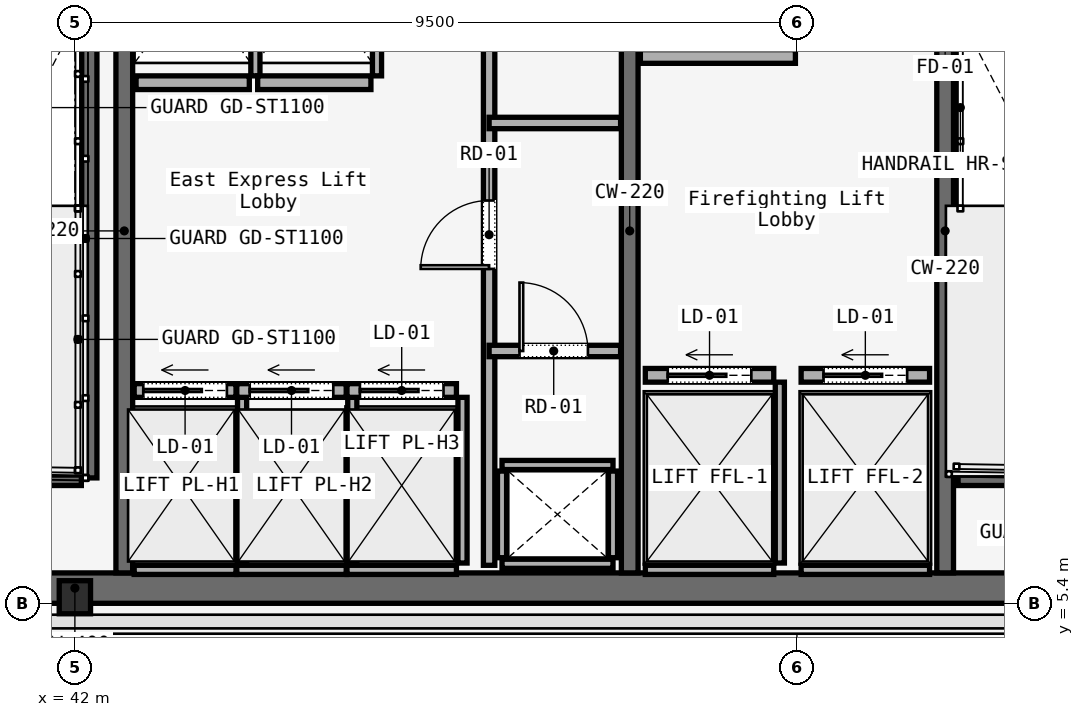
"""IFC4 building model, lengths in metres.
Left out: names, types, materials, properties, quantities, classifications, styles, units other than length and angle.
Written with IfcOpenShell. Run it as: python <this file> out.ifc"""

import sys

from ifc_helpers import new_model, si_unit, direction, frame, frame_2d, origin, origin_2d, place, context, subcontext, project, spatial, rectangle, i_section, extrude, element, fill, save


model = new_model("IFC4")
c1 = context("Model", 3, precision=1e-05, world=origin(), true_north=direction((0.0, 1.0)))
c2 = subcontext(c1, "Body", "Model", "MODEL_VIEW")
j1 = project(units=[si_unit("LENGTHUNIT", "METRE"), si_unit("PLANEANGLEUNIT", "RADIAN")], contexts=[c1])
p1 = place(None, origin())
s1 = spatial("IfcSite", under=j1, at=p1, CompositionType="ELEMENT")
p2 = place(p1, origin())
s2 = spatial("IfcBuilding", under=s1, at=p2, CompositionType="ELEMENT")
p3 = place(p2, frame((0.0, 0.0, 244.6)))
s3 = spatial("IfcBuildingStorey", under=s2, at=p3, CompositionType="ELEMENT", Elevation=244.6)
p4 = place(p3, frame((26.45, 5.6, 0.0), z_axis=(0.0, 0.0, 1.0), x_axis=(1.0, 0.0, 0.0)))
e1 = element("IfcWall", 1, at=p4, inside=s3, PredefinedType="SOLIDWALL", context=c2, shape_type="SweptSolid", body=[
    extrude(rectangle(XDim=31.1, YDim=0.4, at=frame_2d((15.55, 0.0))), origin(), (0.0, 0.0, 1.0), 3.58),
])
for number, where, z_axis, x_axis in (
    (2, (42.65, 5.8, 0.0), (0.0, 0.0, 1.0), (0.0, 1.0, 0.0)),
    (3, (49.3, 5.8, 0.0), (0.0, 0.0, 1.0), (0.0, 1.0, 0.0)),
):
    element("IfcWall", number, at=place(p3, frame(where, z_axis=z_axis, x_axis=x_axis)), inside=s3, PredefinedType="SOLIDWALL", context=c2, shape_type="SweptSolid", body=[
        extrude(rectangle(XDim=9.0, YDim=0.22, at=frame_2d((4.5, 0.0))), origin(), (0.0, 0.0, 1.0), 3.58),
    ])
p5 = place(p3, frame((53.45, 5.8, 0.0), z_axis=(0.0, 0.0, 1.0), x_axis=(0.0, 1.0, 0.0)))
e4 = element("IfcWall", 4, at=p5, inside=s3, PredefinedType="SOLIDWALL", context=c2, shape_type="SweptSolid", body=[
    extrude(rectangle(XDim=9.0, YDim=0.22, at=frame_2d((4.5, 0.0))), origin(), (0.0, 0.0, 1.0), 3.58),
])
p6 = place(p5, frame((7.5, 0.0, 0.0)))
e5 = element("IfcOpeningElement", 5, at=p6, cuts=e4, PredefinedType="OPENING", context=c2, shape_type="SweptSolid", body=[
    extrude(rectangle(XDim=1.1, YDim=2.2, at=frame_2d((0.55, 1.1))), frame((0.0, 0.11, 0.0), z_axis=(0.0, -1.0, 0.0), x_axis=(1.0, 0.0, 0.0)), (0.0, 0.0, 1.0), 0.22),
])
p7 = place(p3, frame((42.0, 5.48, 0.0), z_axis=(0.0, 0.0, 1.0), x_axis=(1.0, 0.0, 0.0)))
e6 = element("IfcColumn", 6, at=p7, inside=s3, PredefinedType="COLUMN", context=c2, shape_type="SweptSolid", body=[
    extrude(i_section(OverallWidth=0.412, OverallDepth=0.435, WebThickness=0.036, FlangeThickness=0.044, FilletRadius=0.015, at=origin_2d()), origin(), (0.0, 0.0, 1.0), 3.58),
])
p8 = place(p3, frame((42.19, 14.7, 0.0), z_axis=(0.0, 0.0, 1.0), x_axis=(0.0, -1.0, 0.0)))
e7 = element("IfcWall", 7, at=p8, inside=s3, PredefinedType="SOLIDWALL", context=c2, shape_type="SweptSolid", body=[
    extrude(rectangle(XDim=7.65, YDim=0.2, at=frame_2d((3.825, 0.0))), origin(), (0.0, 0.0, 1.0), 3.8),
])
for number, where, z_axis, x_axis in (
    (8, (38.97, 7.05, 0.0), (0.0, 0.0, 1.0), (1.0, 0.0, 0.0)),
    (9, (53.62, 7.05, 0.0), (0.0, 0.0, 1.0), (1.0, 0.0, 0.0)),
):
    element("IfcWall", number, at=place(p3, frame(where, z_axis=z_axis, x_axis=x_axis)), inside=s3, PredefinedType="SOLIDWALL", context=c2, shape_type="SweptSolid", body=[
        extrude(rectangle(XDim=3.115, YDim=0.2, at=frame_2d((1.558, 0.0))), origin(), (0.0, 0.0, 1.0), 3.8),
    ])
for number, where, z_axis, x_axis in (
    (10, (47.62, 5.92, 0.0), (0.0, 0.0, 1.0), (1.0, 0.0, 0.0)),
    (11, (47.62, 7.22, 0.0), (0.0, 0.0, 1.0), (1.0, 0.0, 0.0)),
):
    element("IfcWall", number, at=place(p3, frame(where, z_axis=z_axis, x_axis=x_axis)), inside=s3, PredefinedType="SOLIDWALL", context=c2, shape_type="SweptSolid", body=[
        extrude(rectangle(XDim=1.46, YDim=0.12, at=frame_2d((0.73, 0.0))), origin(), (0.0, 0.0, 1.0), 3.01),
    ])
for number, where, z_axis, x_axis in (
    (12, (47.62, 6.0, 0.0), (0.0, 0.0, 1.0), (0.0, 1.0, 0.0)),
    (13, (49.08, 6.0, 0.0), (0.0, 0.0, 1.0), (0.0, 1.0, 0.0)),
):
    element("IfcWall", number, at=place(p3, frame(where, z_axis=z_axis, x_axis=x_axis)), inside=s3, PredefinedType="SOLIDWALL", context=c2, shape_type="SweptSolid", body=[
        extrude(rectangle(XDim=1.14, YDim=0.12, at=frame_2d((0.57, 0.0))), origin(), (0.0, 0.0, 1.0), 3.01),
    ])
p9 = place(p3, frame((47.45, 5.9, 0.0), z_axis=(0.0, 0.0, 1.0), x_axis=(0.0, 1.0, 0.0)))
e14 = element("IfcWall", 14, at=p9, inside=s3, PredefinedType="PARTITIONING", context=c2, shape_type="SweptSolid", body=[
    extrude(rectangle(XDim=8.85, YDim=0.15, at=frame_2d((4.425, 0.0))), origin(), (0.0, 0.0, 1.0), 3.01),
])
p10 = place(p9, frame((3.9, 0.0, 0.0)))
e15 = element("IfcOpeningElement", 15, at=p10, cuts=e14, PredefinedType="OPENING", context=c2, shape_type="SweptSolid", body=[
    extrude(rectangle(XDim=0.9, YDim=2.1, at=frame_2d((0.45, 1.05))), frame((0.0, 0.075, 0.0), z_axis=(0.0, -1.0, 0.0), x_axis=(1.0, 0.0, 0.0)), (0.0, 0.0, 1.0), 0.15),
])
p11 = place(p3, frame((47.45, 8.72, 0.0), z_axis=(0.0, 0.0, 1.0), x_axis=(1.0, 0.0, 0.0)))
e16 = element("IfcWall", 16, at=p11, inside=s3, PredefinedType="PARTITIONING", context=c2, shape_type="SweptSolid", body=[
    extrude(rectangle(XDim=1.73, YDim=0.15, at=frame_2d((0.865, 0.0))), origin(), (0.0, 0.0, 1.0), 3.01),
])
p12 = place(p11, frame((0.4, 0.0, 0.0)))
e17 = element("IfcOpeningElement", 17, at=p12, cuts=e16, PredefinedType="OPENING", context=c2, shape_type="SweptSolid", body=[
    extrude(rectangle(XDim=0.9, YDim=2.1, at=frame_2d((0.45, 1.05))), frame((0.0, 0.075, 0.0), z_axis=(0.0, -1.0, 0.0), x_axis=(1.0, 0.0, 0.0)), (0.0, 0.0, 1.0), 0.15),
])
p13 = place(p3, frame((47.45, 11.72, 0.0), z_axis=(0.0, 0.0, 1.0), x_axis=(1.0, 0.0, 0.0)))
e18 = element("IfcWall", 18, at=p13, inside=s3, PredefinedType="PARTITIONING", context=c2, shape_type="SweptSolid", body=[
    extrude(rectangle(XDim=1.73, YDim=0.15, at=frame_2d((0.865, 0.0))), origin(), (0.0, 0.0, 1.0), 3.01),
])
p14 = place(p3, frame((42.78, 8.2, 0.0), z_axis=(0.0, 0.0, 1.0), x_axis=(1.0, 0.0, 0.0)))
e19 = element("IfcWall", 19, at=p14, inside=s3, PredefinedType="SOLIDWALL", context=c2, shape_type="SweptSolid", body=[
    extrude(rectangle(XDim=1.34, YDim=0.18, at=frame_2d((0.67, 0.0))), origin(), (0.0, 0.0, 1.0), 3.01),
])
p15 = place(p14, frame((0.12, 0.0, 0.0)))
e20 = element("IfcOpeningElement", 20, at=p15, cuts=e19, PredefinedType="OPENING", context=c2, shape_type="SweptSolid", body=[
    extrude(rectangle(XDim=1.1, YDim=2.2, at=frame_2d((0.55, 1.1))), frame((0.0, 0.09, 0.0), z_axis=(0.0, -1.0, 0.0), x_axis=(1.0, 0.0, 0.0)), (0.0, 0.0, 1.0), 0.18),
])
p16 = place(p3, frame((42.78, 5.84, 0.0), z_axis=(0.0, 0.0, 1.0), x_axis=(1.0, 0.0, 0.0)))
e21 = element("IfcWall", 21, at=p16, inside=s3, PredefinedType="SOLIDWALL", context=c2, shape_type="SweptSolid", body=[
    extrude(rectangle(XDim=1.34, YDim=0.12, at=frame_2d((0.67, 0.0))), origin(), (0.0, 0.0, 1.0), 3.01),
])
p17 = place(p3, frame((44.2, 5.93, 0.0), z_axis=(0.0, 0.0, 1.0), x_axis=(0.0, 1.0, 0.0)))
e22 = element("IfcWall", 22, at=p17, inside=s3, PredefinedType="SOLIDWALL", context=c2, shape_type="SweptSolid", body=[
    extrude(rectangle(XDim=2.18, YDim=0.12, at=frame_2d((1.09, 0.0))), origin(), (0.0, 0.0, 1.0), 3.01),
])
p18 = place(p3, frame((44.13, 8.2, 0.0), z_axis=(0.0, 0.0, 1.0), x_axis=(1.0, 0.0, 0.0)))
e23 = element("IfcWall", 23, at=p18, inside=s3, PredefinedType="SOLIDWALL", context=c2, shape_type="SweptSolid", body=[
    extrude(rectangle(XDim=1.44, YDim=0.18, at=frame_2d((0.72, 0.0))), origin(), (0.0, 0.0, 1.0), 3.01),
])
p19 = place(p18, frame((0.17, 0.0, 0.0)))
e24 = element("IfcOpeningElement", 24, at=p19, cuts=e23, PredefinedType="OPENING", context=c2, shape_type="SweptSolid", body=[
    extrude(rectangle(XDim=1.1, YDim=2.2, at=frame_2d((0.55, 1.1))), frame((0.0, 0.09, 0.0), z_axis=(0.0, -1.0, 0.0), x_axis=(1.0, 0.0, 0.0)), (0.0, 0.0, 1.0), 0.18),
])
p20 = place(p3, frame((44.13, 5.84, 0.0), z_axis=(0.0, 0.0, 1.0), x_axis=(1.0, 0.0, 0.0)))
e25 = element("IfcWall", 25, at=p20, inside=s3, PredefinedType="SOLIDWALL", context=c2, shape_type="SweptSolid", body=[
    extrude(rectangle(XDim=1.44, YDim=0.12, at=frame_2d((0.72, 0.0))), origin(), (0.0, 0.0, 1.0), 3.01),
])
p21 = place(p3, frame((45.65, 5.93, 0.0), z_axis=(0.0, 0.0, 1.0), x_axis=(0.0, 1.0, 0.0)))
e26 = element("IfcWall", 26, at=p21, inside=s3, PredefinedType="SOLIDWALL", context=c2, shape_type="SweptSolid", body=[
    extrude(rectangle(XDim=2.18, YDim=0.12, at=frame_2d((1.09, 0.0))), origin(), (0.0, 0.0, 1.0), 3.01),
])
p22 = place(p3, frame((45.58, 8.2, 0.0), z_axis=(0.0, 0.0, 1.0), x_axis=(1.0, 0.0, 0.0)))
e27 = element("IfcWall", 27, at=p22, inside=s3, PredefinedType="SOLIDWALL", context=c2, shape_type="SweptSolid", body=[
    extrude(rectangle(XDim=1.44, YDim=0.18, at=frame_2d((0.72, 0.0))), origin(), (0.0, 0.0, 1.0), 3.01),
])
p23 = place(p22, frame((0.17, 0.0, 0.0)))
e28 = element("IfcOpeningElement", 28, at=p23, cuts=e27, PredefinedType="OPENING", context=c2, shape_type="SweptSolid", body=[
    extrude(rectangle(XDim=1.1, YDim=2.2, at=frame_2d((0.55, 1.1))), frame((0.0, 0.09, 0.0), z_axis=(0.0, -1.0, 0.0), x_axis=(1.0, 0.0, 0.0)), (0.0, 0.0, 1.0), 0.18),
])
p24 = place(p3, frame((45.58, 5.84, 0.0), z_axis=(0.0, 0.0, 1.0), x_axis=(1.0, 0.0, 0.0)))
e29 = element("IfcWall", 29, at=p24, inside=s3, PredefinedType="SOLIDWALL", context=c2, shape_type="SweptSolid", body=[
    extrude(rectangle(XDim=1.44, YDim=0.12, at=frame_2d((0.72, 0.0))), origin(), (0.0, 0.0, 1.0), 3.01),
])
p25 = place(p3, frame((47.1, 5.93, 0.0), z_axis=(0.0, 0.0, 1.0), x_axis=(0.0, 1.0, 0.0)))
e30 = element("IfcWall", 30, at=p25, inside=s3, PredefinedType="SOLIDWALL", context=c2, shape_type="SweptSolid", body=[
    extrude(rectangle(XDim=2.18, YDim=0.12, at=frame_2d((1.09, 0.0))), origin(), (0.0, 0.0, 1.0), 3.01),
])
p26 = place(p3, frame((42.805, 12.25, 0.0), z_axis=(0.0, 0.0, 1.0), x_axis=(1.0, 0.0, 0.0)))
e31 = element("IfcWall", 31, at=p26, inside=s3, PredefinedType="SOLIDWALL", context=c2, shape_type="SweptSolid", body=[
    extrude(rectangle(XDim=1.49, YDim=0.18, at=frame_2d((0.745, 0.0))), origin(), (0.0, 0.0, 1.0), 3.01),
])
p27 = place(p3, frame((44.375, 12.34, 0.0), z_axis=(0.0, 0.0, 1.0), x_axis=(0.0, 1.0, 0.0)))
e32 = element("IfcWall", 32, at=p27, inside=s3, PredefinedType="SOLIDWALL", context=c2, shape_type="SweptSolid", body=[
    extrude(rectangle(XDim=2.23, YDim=0.12, at=frame_2d((1.115, 0.0))), origin(), (0.0, 0.0, 1.0), 3.01),
])
p28 = place(p3, frame((44.405, 12.25, 0.0), z_axis=(0.0, 0.0, 1.0), x_axis=(1.0, 0.0, 0.0)))
e33 = element("IfcWall", 33, at=p28, inside=s3, PredefinedType="SOLIDWALL", context=c2, shape_type="SweptSolid", body=[
    extrude(rectangle(XDim=1.49, YDim=0.18, at=frame_2d((0.745, 0.0))), origin(), (0.0, 0.0, 1.0), 3.01),
])
p29 = place(p3, frame((45.975, 12.34, 0.0), z_axis=(0.0, 0.0, 1.0), x_axis=(0.0, 1.0, 0.0)))
e34 = element("IfcWall", 34, at=p29, inside=s3, PredefinedType="SOLIDWALL", context=c2, shape_type="SweptSolid", body=[
    extrude(rectangle(XDim=2.23, YDim=0.12, at=frame_2d((1.115, 0.0))), origin(), (0.0, 0.0, 1.0), 3.01),
])
p30 = place(p3, frame((49.505, 8.4, 0.0), z_axis=(0.0, 0.0, 1.0), x_axis=(1.0, 0.0, 0.0)))
e35 = element("IfcWall", 35, at=p30, inside=s3, PredefinedType="SOLIDWALL", context=c2, shape_type="SweptSolid", body=[
    extrude(rectangle(XDim=1.69, YDim=0.18, at=frame_2d((0.845, 0.0))), origin(), (0.0, 0.0, 1.0), 3.01),
])
p31 = place(p30, frame((0.295, 0.0, 0.0)))
e36 = element("IfcOpeningElement", 36, at=p31, cuts=e35, PredefinedType="OPENING", context=c2, shape_type="SweptSolid", body=[
    extrude(rectangle(XDim=1.1, YDim=2.2, at=frame_2d((0.55, 1.1))), frame((0.0, 0.09, 0.0), z_axis=(0.0, -1.0, 0.0), x_axis=(1.0, 0.0, 0.0)), (0.0, 0.0, 1.0), 0.18),
])
p32 = place(p3, frame((49.505, 5.84, 0.0), z_axis=(0.0, 0.0, 1.0), x_axis=(1.0, 0.0, 0.0)))
e37 = element("IfcWall", 37, at=p32, inside=s3, PredefinedType="SOLIDWALL", context=c2, shape_type="SweptSolid", body=[
    extrude(rectangle(XDim=1.69, YDim=0.12, at=frame_2d((0.845, 0.0))), origin(), (0.0, 0.0, 1.0), 3.01),
])
p33 = place(p3, frame((51.275, 5.93, 0.0), z_axis=(0.0, 0.0, 1.0), x_axis=(0.0, 1.0, 0.0)))
e38 = element("IfcWall", 38, at=p33, inside=s3, PredefinedType="SOLIDWALL", context=c2, shape_type="SweptSolid", body=[
    extrude(rectangle(XDim=2.38, YDim=0.12, at=frame_2d((1.19, 0.0))), origin(), (0.0, 0.0, 1.0), 3.01),
])
p34 = place(p3, frame((51.555, 8.4, 0.0), z_axis=(0.0, 0.0, 1.0), x_axis=(1.0, 0.0, 0.0)))
e39 = element("IfcWall", 39, at=p34, inside=s3, PredefinedType="SOLIDWALL", context=c2, shape_type="SweptSolid", body=[
    extrude(rectangle(XDim=1.69, YDim=0.18, at=frame_2d((0.845, 0.0))), origin(), (0.0, 0.0, 1.0), 3.01),
])
p35 = place(p34, frame((0.295, 0.0, 0.0)))
e40 = element("IfcOpeningElement", 40, at=p35, cuts=e39, PredefinedType="OPENING", context=c2, shape_type="SweptSolid", body=[
    extrude(rectangle(XDim=1.1, YDim=2.2, at=frame_2d((0.55, 1.1))), frame((0.0, 0.09, 0.0), z_axis=(0.0, -1.0, 0.0), x_axis=(1.0, 0.0, 0.0)), (0.0, 0.0, 1.0), 0.18),
])
p36 = place(p3, frame((51.555, 5.84, 0.0), z_axis=(0.0, 0.0, 1.0), x_axis=(1.0, 0.0, 0.0)))
e41 = element("IfcWall", 41, at=p36, inside=s3, PredefinedType="SOLIDWALL", context=c2, shape_type="SweptSolid", body=[
    extrude(rectangle(XDim=1.69, YDim=0.12, at=frame_2d((0.845, 0.0))), origin(), (0.0, 0.0, 1.0), 3.01),
])
p37 = place(p3, frame((49.44, 12.595, 0.0), z_axis=(0.0, 0.0, 1.0), x_axis=(1.0, 0.0, 0.0)))
e42 = element("IfcWall", 42, at=p37, inside=s3, PredefinedType="SOLIDWALL", context=c2, shape_type="SweptSolid", body=[
    extrude(rectangle(XDim=2.04, YDim=0.18, at=frame_2d((1.02, 0.0))), origin(), (0.0, 0.0, 1.0), 3.01),
])
p38 = place(p10, origin())
e43 = element("IfcDoor", 43, at=p38, inside=s3, OperationType="SINGLE_SWING_LEFT", PredefinedType="DOOR", context=c2, shape_type="SweptSolid", body=[
    extrude(rectangle(XDim=0.9, YDim=2.1, at=frame_2d((0.45, 1.05))), frame((0.0, 0.025, 0.0), z_axis=(0.0, -1.0, 0.0), x_axis=(1.0, 0.0, 0.0)), (0.0, 0.0, 1.0), 0.05),
])
fill(e15, e43)
p39 = place(p12, origin())
e44 = element("IfcDoor", 44, at=p39, inside=s3, OperationType="SINGLE_SWING_RIGHT", PredefinedType="DOOR", context=c2, shape_type="SweptSolid", body=[
    extrude(rectangle(XDim=0.9, YDim=2.1, at=frame_2d((0.45, 1.05))), frame((0.0, 0.025, 0.0), z_axis=(0.0, -1.0, 0.0), x_axis=(1.0, 0.0, 0.0)), (0.0, 0.0, 1.0), 0.05),
])
fill(e17, e44)
p40 = place(p15, origin())
e45 = element("IfcDoor", 45, at=p40, inside=s3, OperationType="SLIDING_TO_LEFT", PredefinedType="DOOR", context=c2, shape_type="SweptSolid", body=[
    extrude(rectangle(XDim=1.1, YDim=2.2, at=frame_2d((0.55, 1.1))), frame((0.0, 0.025, 0.0), z_axis=(0.0, -1.0, 0.0), x_axis=(1.0, 0.0, 0.0)), (0.0, 0.0, 1.0), 0.05),
])
fill(e20, e45)
p41 = place(p19, origin())
e46 = element("IfcDoor", 46, at=p41, inside=s3, OperationType="SLIDING_TO_LEFT", PredefinedType="DOOR", context=c2, shape_type="SweptSolid", body=[
    extrude(rectangle(XDim=1.1, YDim=2.2, at=frame_2d((0.55, 1.1))), frame((0.0, 0.025, 0.0), z_axis=(0.0, -1.0, 0.0), x_axis=(1.0, 0.0, 0.0)), (0.0, 0.0, 1.0), 0.05),
])
fill(e24, e46)
p42 = place(p23, origin())
e47 = element("IfcDoor", 47, at=p42, inside=s3, OperationType="SLIDING_TO_LEFT", PredefinedType="DOOR", context=c2, shape_type="SweptSolid", body=[
    extrude(rectangle(XDim=1.1, YDim=2.2, at=frame_2d((0.55, 1.1))), frame((0.0, 0.025, 0.0), z_axis=(0.0, -1.0, 0.0), x_axis=(1.0, 0.0, 0.0)), (0.0, 0.0, 1.0), 0.05),
])
fill(e28, e47)
p43 = place(p31, origin())
e48 = element("IfcDoor", 48, at=p43, inside=s3, OperationType="SLIDING_TO_LEFT", PredefinedType="DOOR", context=c2, shape_type="SweptSolid", body=[
    extrude(rectangle(XDim=1.1, YDim=2.2, at=frame_2d((0.55, 1.1))), frame((0.0, 0.025, 0.0), z_axis=(0.0, -1.0, 0.0), x_axis=(1.0, 0.0, 0.0)), (0.0, 0.0, 1.0), 0.05),
])
fill(e36, e48)
p44 = place(p35, origin())
e49 = element("IfcDoor", 49, at=p44, inside=s3, OperationType="SLIDING_TO_LEFT", PredefinedType="DOOR", context=c2, shape_type="SweptSolid", body=[
    extrude(rectangle(XDim=1.1, YDim=2.2, at=frame_2d((0.55, 1.1))), frame((0.0, 0.025, 0.0), z_axis=(0.0, -1.0, 0.0), x_axis=(1.0, 0.0, 0.0)), (0.0, 0.0, 1.0), 0.05),
])
fill(e40, e49)
save(model, sys.argv[1])
